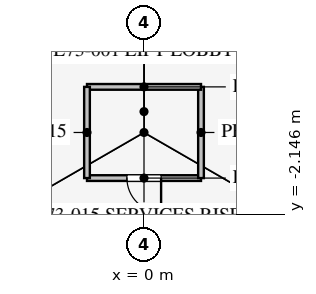
"""IFC4 building model, lengths in metres.
Left out: names, types, materials, properties, quantities, classifications, styles, units other than length and angle.
Written with IfcOpenShell. Run it as: python <this file> out.ifc"""

import sys

from ifc_helpers import new_model, si_unit, direction, frame, frame_2d, origin, place, context, subcontext, project, spatial, rectangle, extrude, element, fill, save


model = new_model("IFC4")
c1 = context("Model", 3, precision=1e-05, world=origin(), true_north=direction((0.0, 1.0)))
c2 = subcontext(c1, "Body", "Model", "MODEL_VIEW")
j1 = project(units=[si_unit("LENGTHUNIT", "METRE"), si_unit("PLANEANGLEUNIT", "RADIAN")], contexts=[c1])
p1 = place(None, origin())
s1 = spatial("IfcSite", under=j1, at=p1, CompositionType="ELEMENT")
p2 = place(p1, origin())
s2 = spatial("IfcBuilding", under=s1, at=p2, CompositionType="ELEMENT")
p3 = place(p2, frame((0.0, 0.0, 318.3)))
s3 = spatial("IfcBuildingStorey", under=s2, at=p3, CompositionType="ELEMENT", Elevation=318.3)
p4 = place(p3, frame((-1.5, -1.2, 0.0), z_axis=(0.0, 0.0, 1.0), x_axis=(1.0, 0.0, 0.0)))
e1 = element("IfcWall", 1, at=p4, inside=s3, PredefinedType="PARTITIONING", context=c2, shape_type="SweptSolid", body=[
    extrude(rectangle(XDim=3.0, YDim=0.15, at=frame_2d((1.5, 0.0))), origin(), (0.0, 0.0, 1.0), 4.0),
])
p5 = place(p4, frame((1.05, 0.0, 0.0)))
e2 = element("IfcOpeningElement", 2, at=p5, cuts=e1, PredefinedType="OPENING", context=c2, shape_type="SweptSolid", body=[
    extrude(rectangle(XDim=0.9, YDim=2.1, at=frame_2d((0.45, 1.05))), frame((0.0, 0.085, 0.0), z_axis=(0.0, -1.0, 0.0), x_axis=(1.0, 0.0, 0.0)), (0.0, 0.0, 1.0), 0.17),
])
p6 = place(p3, frame((1.5, -1.2, 0.0), z_axis=(0.0, 0.0, 1.0), x_axis=(0.0, 1.0, 0.0)))
e3 = element("IfcWall", 3, at=p6, inside=s3, PredefinedType="PARTITIONING", context=c2, shape_type="SweptSolid", body=[
    extrude(rectangle(XDim=2.4, YDim=0.15, at=frame_2d((1.2, 0.0))), origin(), (0.0, 0.0, 1.0), 4.0),
])
p7 = place(p3, frame((1.5, 1.2, 0.0), z_axis=(0.0, 0.0, 1.0), x_axis=(-1.0, 0.0, 0.0)))
e4 = element("IfcWall", 4, at=p7, inside=s3, PredefinedType="PARTITIONING", context=c2, shape_type="SweptSolid", body=[
    extrude(rectangle(XDim=3.0, YDim=0.15, at=frame_2d((1.5, 0.0))), origin(), (0.0, 0.0, 1.0), 4.0),
])
p8 = place(p3, frame((-1.5, 1.2, 0.0), z_axis=(0.0, 0.0, 1.0), x_axis=(0.0, -1.0, 0.0)))
e5 = element("IfcWall", 5, at=p8, inside=s3, PredefinedType="PARTITIONING", context=c2, shape_type="SweptSolid", body=[
    extrude(rectangle(XDim=2.4, YDim=0.15, at=frame_2d((1.2, 0.0))), origin(), (0.0, 0.0, 1.0), 4.0),
])
p9 = place(p5, frame((0.9, 0.0, 0.0), z_axis=(0.0, 0.0, 1.0), x_axis=(-1.0, 0.0, 0.0)))
e6 = element("IfcDoor", 6, at=p9, inside=s3, OperationType="SINGLE_SWING_LEFT", PredefinedType="DOOR", context=c2, shape_type="SweptSolid", body=[
    extrude(rectangle(XDim=0.9, YDim=2.1, at=frame_2d((0.45, 1.05))), frame((0.0, 0.025, 0.0), z_axis=(0.0, -1.0, 0.0), x_axis=(1.0, 0.0, 0.0)), (0.0, 0.0, 1.0), 0.05),
])
fill(e2, e6)
save(model, sys.argv[1])
